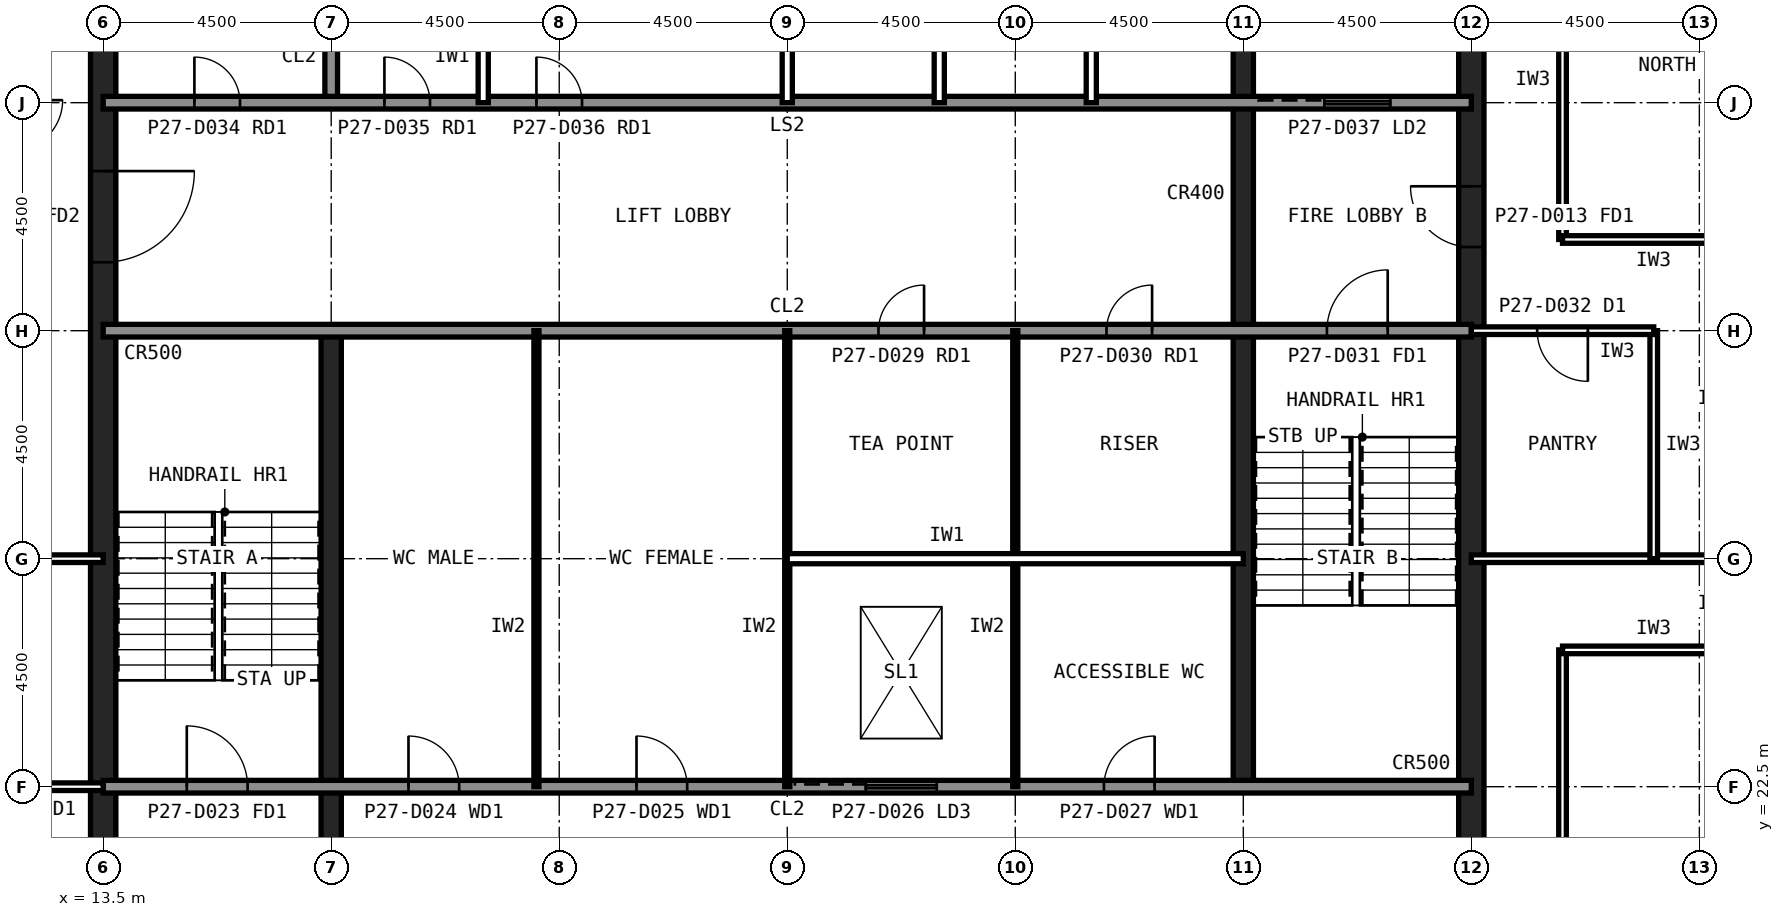
"""IFC4 building model, lengths in metres.
Left out: names, types, materials, properties, quantities, classifications, styles, units other than length and angle.
Written with IfcOpenShell. Run it as: python <this file> out.ifc"""

import sys

from ifc_helpers import new_model, si_unit, direction, frame, frame_2d, origin, place, context, subcontext, project, spatial, rectangle, extrude, element, fill, save


model = new_model("IFC4")
c1 = context("Model", 3, precision=1e-05, world=origin(), true_north=direction((0.0, 1.0)))
c2 = subcontext(c1, "Body", "Model", "MODEL_VIEW")
j1 = project(units=[si_unit("LENGTHUNIT", "METRE"), si_unit("PLANEANGLEUNIT", "RADIAN")], contexts=[c1])
p1 = place(None, origin())
s1 = spatial("IfcSite", under=j1, at=p1, CompositionType="ELEMENT")
p2 = place(p1, origin())
s2 = spatial("IfcBuilding", under=s1, at=p2, CompositionType="ELEMENT")
p3 = place(p2, frame((0.0, 0.0, 119.6)))
s3 = spatial("IfcBuildingStorey", under=s2, at=p3, CompositionType="ELEMENT", Elevation=119.6)
p4 = place(p3, frame((40.5, 13.5, 0.0), z_axis=(0.0, 0.0, 1.0), x_axis=(0.0, 1.0, 0.0)))
e1 = element("IfcWall", 1, at=p4, inside=s3, PredefinedType="SHEAR", context=c2, shape_type="SweptSolid", body=[
    extrude(rectangle(XDim=27.0, YDim=0.5, at=frame_2d((13.5, 0.0))), origin(), (0.0, 0.0, 1.0), 4.0),
])
p5 = place(p4, frame((5.85, 0.0, 0.0)))
e2 = element("IfcOpeningElement", 2, at=p5, cuts=e1, PredefinedType="OPENING", context=c2, shape_type="SweptSolid", body=[
    extrude(rectangle(XDim=1.8, YDim=2.1, at=frame_2d((0.9, 1.05))), frame((0.0, 0.26, 0.0), z_axis=(0.0, -1.0, 0.0), x_axis=(1.0, 0.0, 0.0)), (0.0, 0.0, 1.0), 0.52),
])
p6 = place(p4, frame((19.65, 0.0, 0.0)))
e3 = element("IfcOpeningElement", 3, at=p6, cuts=e1, PredefinedType="OPENING", context=c2, shape_type="SweptSolid", body=[
    extrude(rectangle(XDim=1.2, YDim=2.1, at=frame_2d((0.6, 1.05))), frame((0.0, 0.26, 0.0), z_axis=(0.0, -1.0, 0.0), x_axis=(1.0, 0.0, 0.0)), (0.0, 0.0, 1.0), 0.52),
])
p7 = place(p3, frame((13.5, 40.5, 0.0), z_axis=(0.0, 0.0, 1.0), x_axis=(0.0, -1.0, 0.0)))
e4 = element("IfcWall", 4, at=p7, inside=s3, PredefinedType="SHEAR", context=c2, shape_type="SweptSolid", body=[
    extrude(rectangle(XDim=27.0, YDim=0.5, at=frame_2d((13.5, 0.0))), origin(), (0.0, 0.0, 1.0), 4.0),
])
p8 = place(p7, frame((19.65, 0.0, 0.0)))
e5 = element("IfcOpeningElement", 5, at=p8, cuts=e4, PredefinedType="OPENING", context=c2, shape_type="SweptSolid", body=[
    extrude(rectangle(XDim=1.2, YDim=2.1, at=frame_2d((0.6, 1.05))), frame((0.0, 0.26, 0.0), z_axis=(0.0, -1.0, 0.0), x_axis=(1.0, 0.0, 0.0)), (0.0, 0.0, 1.0), 0.52),
])
p9 = place(p7, frame((5.85, 0.0, 0.0)))
e6 = element("IfcOpeningElement", 6, at=p9, cuts=e4, PredefinedType="OPENING", context=c2, shape_type="SweptSolid", body=[
    extrude(rectangle(XDim=1.8, YDim=2.1, at=frame_2d((0.9, 1.05))), frame((0.0, 0.26, 0.0), z_axis=(0.0, -1.0, 0.0), x_axis=(1.0, 0.0, 0.0)), (0.0, 0.0, 1.0), 0.52),
])
p10 = place(p3, frame((18.0, 13.5, 0.0), z_axis=(0.0, 0.0, 1.0), x_axis=(0.0, 1.0, 0.0)))
e7 = element("IfcWall", 7, at=p10, inside=s3, PredefinedType="SHEAR", context=c2, shape_type="SweptSolid", body=[
    extrude(rectangle(XDim=18.0, YDim=0.4, at=frame_2d((9.0, 0.0))), origin(), (0.0, 0.0, 1.0), 4.0),
])
p11 = place(p3, frame((18.0, 36.0, 0.0), z_axis=(0.0, 0.0, 1.0), x_axis=(0.0, 1.0, 0.0)))
e8 = element("IfcWall", 8, at=p11, inside=s3, PredefinedType="SOLIDWALL", context=c2, shape_type="SweptSolid", body=[
    extrude(rectangle(XDim=4.5, YDim=0.25, at=frame_2d((2.25, 0.0))), origin(), (0.0, 0.0, 1.0), 3.84),
])
p12 = place(p3, frame((36.0, 22.5, 0.0), z_axis=(0.0, 0.0, 1.0), x_axis=(0.0, 1.0, 0.0)))
e9 = element("IfcWall", 9, at=p12, inside=s3, PredefinedType="SHEAR", context=c2, shape_type="SweptSolid", body=[
    extrude(rectangle(XDim=18.0, YDim=0.4, at=frame_2d((9.0, 0.0))), origin(), (0.0, 0.0, 1.0), 4.0),
])
p13 = place(p3, frame((13.5, 36.0, 0.0), z_axis=(0.0, 0.0, 1.0), x_axis=(1.0, 0.0, 0.0)))
e10 = element("IfcWall", 10, at=p13, inside=s3, PredefinedType="SOLIDWALL", context=c2, shape_type="SweptSolid", body=[
    extrude(rectangle(XDim=27.0, YDim=0.25, at=frame_2d((13.5, 0.0))), origin(), (0.0, 0.0, 1.0), 3.84),
])
p14 = place(p13, frame((1.8, 0.0, 0.0)))
e11 = element("IfcOpeningElement", 11, at=p14, cuts=e10, PredefinedType="OPENING", context=c2, shape_type="SweptSolid", body=[
    extrude(rectangle(XDim=0.9, YDim=2.1, at=frame_2d((0.45, 1.05))), frame((0.0, 0.135, 0.0), z_axis=(0.0, -1.0, 0.0), x_axis=(1.0, 0.0, 0.0)), (0.0, 0.0, 1.0), 0.27),
])
p15 = place(p13, frame((5.55, 0.0, 0.0)))
e12 = element("IfcOpeningElement", 12, at=p15, cuts=e10, PredefinedType="OPENING", context=c2, shape_type="SweptSolid", body=[
    extrude(rectangle(XDim=0.9, YDim=2.1, at=frame_2d((0.45, 1.05))), frame((0.0, 0.135, 0.0), z_axis=(0.0, -1.0, 0.0), x_axis=(1.0, 0.0, 0.0)), (0.0, 0.0, 1.0), 0.27),
])
p16 = place(p13, frame((8.55, 0.0, 0.0)))
e13 = element("IfcOpeningElement", 13, at=p16, cuts=e10, PredefinedType="OPENING", context=c2, shape_type="SweptSolid", body=[
    extrude(rectangle(XDim=0.9, YDim=2.1, at=frame_2d((0.45, 1.05))), frame((0.0, 0.135, 0.0), z_axis=(0.0, -1.0, 0.0), x_axis=(1.0, 0.0, 0.0)), (0.0, 0.0, 1.0), 0.27),
])
p17 = place(p13, frame((24.1, 0.0, 0.0)))
e14 = element("IfcOpeningElement", 14, at=p17, cuts=e10, PredefinedType="OPENING", context=c2, shape_type="SweptSolid", body=[
    extrude(rectangle(XDim=1.3, YDim=2.2, at=frame_2d((0.65, 1.1))), frame((0.0, 0.135, 0.0), z_axis=(0.0, -1.0, 0.0), x_axis=(1.0, 0.0, 0.0)), (0.0, 0.0, 1.0), 0.27),
])
p18 = place(p3, frame((13.5, 22.5, 0.0), z_axis=(0.0, 0.0, 1.0), x_axis=(1.0, 0.0, 0.0)))
e15 = element("IfcWall", 15, at=p18, inside=s3, PredefinedType="SOLIDWALL", context=c2, shape_type="SweptSolid", body=[
    extrude(rectangle(XDim=27.0, YDim=0.25, at=frame_2d((13.5, 0.0))), origin(), (0.0, 0.0, 1.0), 3.84),
])
p19 = place(p18, frame((1.65, 0.0, 0.0)))
e16 = element("IfcOpeningElement", 16, at=p19, cuts=e15, PredefinedType="OPENING", context=c2, shape_type="SweptSolid", body=[
    extrude(rectangle(XDim=1.2, YDim=2.1, at=frame_2d((0.6, 1.05))), frame((0.0, 0.135, 0.0), z_axis=(0.0, -1.0, 0.0), x_axis=(1.0, 0.0, 0.0)), (0.0, 0.0, 1.0), 0.27),
])
p20 = place(p18, frame((6.025, 0.0, 0.0)))
e17 = element("IfcOpeningElement", 17, at=p20, cuts=e15, PredefinedType="OPENING", context=c2, shape_type="SweptSolid", body=[
    extrude(rectangle(XDim=1.0, YDim=2.1, at=frame_2d((0.5, 1.05))), frame((0.0, 0.135, 0.0), z_axis=(0.0, -1.0, 0.0), x_axis=(1.0, 0.0, 0.0)), (0.0, 0.0, 1.0), 0.27),
])
p21 = place(p18, frame((10.525, 0.0, 0.0)))
e18 = element("IfcOpeningElement", 18, at=p21, cuts=e15, PredefinedType="OPENING", context=c2, shape_type="SweptSolid", body=[
    extrude(rectangle(XDim=1.0, YDim=2.1, at=frame_2d((0.5, 1.05))), frame((0.0, 0.135, 0.0), z_axis=(0.0, -1.0, 0.0), x_axis=(1.0, 0.0, 0.0)), (0.0, 0.0, 1.0), 0.27),
])
p22 = place(p18, frame((19.75, 0.0, 0.0)))
e19 = element("IfcOpeningElement", 19, at=p22, cuts=e15, PredefinedType="OPENING", context=c2, shape_type="SweptSolid", body=[
    extrude(rectangle(XDim=1.0, YDim=2.1, at=frame_2d((0.5, 1.05))), frame((0.0, 0.135, 0.0), z_axis=(0.0, -1.0, 0.0), x_axis=(1.0, 0.0, 0.0)), (0.0, 0.0, 1.0), 0.27),
])
p23 = place(p18, frame((15.05, 0.0, 0.0)))
e20 = element("IfcOpeningElement", 20, at=p23, cuts=e15, PredefinedType="OPENING", context=c2, shape_type="SweptSolid", body=[
    extrude(rectangle(XDim=1.4, YDim=2.4, at=frame_2d((0.7, 1.2))), frame((0.0, 0.135, 0.0), z_axis=(0.0, -1.0, 0.0), x_axis=(1.0, 0.0, 0.0)), (0.0, 0.0, 1.0), 0.27),
])
p24 = place(p3, frame((13.5, 31.5, 0.0), z_axis=(0.0, 0.0, 1.0), x_axis=(1.0, 0.0, 0.0)))
e21 = element("IfcWall", 21, at=p24, inside=s3, PredefinedType="SOLIDWALL", context=c2, shape_type="SweptSolid", body=[
    extrude(rectangle(XDim=27.0, YDim=0.25, at=frame_2d((13.5, 0.0))), origin(), (0.0, 0.0, 1.0), 3.84),
])
p25 = place(p24, frame((24.15, 0.0, 0.0)))
e22 = element("IfcOpeningElement", 22, at=p25, cuts=e21, PredefinedType="OPENING", context=c2, shape_type="SweptSolid", body=[
    extrude(rectangle(XDim=1.2, YDim=2.1, at=frame_2d((0.6, 1.05))), frame((0.0, 0.135, 0.0), z_axis=(0.0, -1.0, 0.0), x_axis=(1.0, 0.0, 0.0)), (0.0, 0.0, 1.0), 0.27),
])
p26 = place(p24, frame((15.3, 0.0, 0.0)))
e23 = element("IfcOpeningElement", 23, at=p26, cuts=e21, PredefinedType="OPENING", context=c2, shape_type="SweptSolid", body=[
    extrude(rectangle(XDim=0.9, YDim=2.1, at=frame_2d((0.45, 1.05))), frame((0.0, 0.135, 0.0), z_axis=(0.0, -1.0, 0.0), x_axis=(1.0, 0.0, 0.0)), (0.0, 0.0, 1.0), 0.27),
])
p27 = place(p24, frame((19.8, 0.0, 0.0)))
e24 = element("IfcOpeningElement", 24, at=p27, cuts=e21, PredefinedType="OPENING", context=c2, shape_type="SweptSolid", body=[
    extrude(rectangle(XDim=0.9, YDim=2.1, at=frame_2d((0.45, 1.05))), frame((0.0, 0.135, 0.0), z_axis=(0.0, -1.0, 0.0), x_axis=(1.0, 0.0, 0.0)), (0.0, 0.0, 1.0), 0.27),
])
for number, where, z_axis, x_axis in (
    (25, (21.0, 36.0, 0.0), (0.0, 0.0, 1.0), (0.0, 1.0, 0.0)),
    (26, (27.0, 36.0, 0.0), (0.0, 0.0, 1.0), (0.0, 1.0, 0.0)),
    (27, (30.0, 36.0, 0.0), (0.0, 0.0, 1.0), (0.0, 1.0, 0.0)),
    (28, (33.0, 36.0, 0.0), (0.0, 0.0, 1.0), (0.0, 1.0, 0.0)),
):
    element("IfcWall", number, at=place(p3, frame(where, z_axis=z_axis, x_axis=x_axis)), inside=s3, PredefinedType="PARTITIONING", context=c2, shape_type="SweptSolid", body=[
        extrude(rectangle(XDim=4.5, YDim=0.2, at=frame_2d((2.25, 0.0))), origin(), (0.0, 0.0, 1.0), 3.84),
    ])
for number, where, z_axis, x_axis in (
    (29, (22.05, 22.5, 0.0), (0.0, 0.0, 1.0), (0.0, 1.0, 0.0)),
    (30, (27.0, 22.5, 0.0), (0.0, 0.0, 1.0), (0.0, 1.0, 0.0)),
    (31, (31.5, 22.5, 0.0), (0.0, 0.0, 1.0), (0.0, 1.0, 0.0)),
):
    element("IfcWall", number, at=place(p3, frame(where, z_axis=z_axis, x_axis=x_axis)), inside=s3, PredefinedType="PLUMBINGWALL", context=c2, shape_type="SweptSolid", body=[
        extrude(rectangle(XDim=9.0, YDim=0.1, at=frame_2d((4.5, 0.0))), origin(), (0.0, 0.0, 1.0), 3.84),
    ])
p28 = place(p3, frame((27.0, 27.0, 0.0), z_axis=(0.0, 0.0, 1.0), x_axis=(1.0, 0.0, 0.0)))
e32 = element("IfcWall", 32, at=p28, inside=s3, PredefinedType="PARTITIONING", context=c2, shape_type="SweptSolid", body=[
    extrude(rectangle(XDim=9.0, YDim=0.2, at=frame_2d((4.5, 0.0))), origin(), (0.0, 0.0, 1.0), 3.84),
])
for number, where, z_axis, x_axis in (
    (33, (0.385, 27.0, 0.0), (0.0, 0.0, 1.0), (1.0, 0.0, 0.0)),
    (34, (40.5, 27.0, 0.0), (0.0, 0.0, 1.0), (1.0, 0.0, 0.0)),
):
    element("IfcWall", number, at=place(p3, frame(where, z_axis=z_axis, x_axis=x_axis)), inside=s3, PredefinedType="PARTITIONING", context=c2, shape_type="SweptSolid", body=[
        extrude(rectangle(XDim=13.115, YDim=0.15, at=frame_2d((6.558, 0.0))), origin(), (0.0, 0.0, 1.0), 2.989),
    ])
p29 = place(p3, frame((42.3, 11.7, 0.0), z_axis=(0.0, 0.0, 1.0), x_axis=(0.0, 1.0, 0.0)))
e35 = element("IfcWall", 35, at=p29, inside=s3, PredefinedType="PARTITIONING", context=c2, shape_type="SweptSolid", body=[
    extrude(rectangle(XDim=13.5, YDim=0.15, at=frame_2d((6.75, 0.0))), origin(), (0.0, 0.0, 1.0), 3.84),
])
p30 = place(p29, frame((6.25, 0.0, 0.0)))
e36 = element("IfcOpeningElement", 36, at=p30, cuts=e35, PredefinedType="OPENING", context=c2, shape_type="SweptSolid", body=[
    extrude(rectangle(XDim=1.0, YDim=2.1, at=frame_2d((0.5, 1.05))), frame((0.0, 0.085, 0.0), z_axis=(0.0, -1.0, 0.0), x_axis=(1.0, 0.0, 0.0)), (0.0, 0.0, 1.0), 0.17),
])
p31 = place(p3, frame((42.3, 25.2, 0.0), z_axis=(0.0, 0.0, 1.0), x_axis=(1.0, 0.0, 0.0)))
e37 = element("IfcWall", 37, at=p31, inside=s3, PredefinedType="PARTITIONING", context=c2, shape_type="SweptSolid", body=[
    extrude(rectangle(XDim=3.6, YDim=0.15, at=frame_2d((1.8, 0.0))), origin(), (0.0, 0.0, 1.0), 3.84),
])
p32 = place(p3, frame((42.3, 33.3, 0.0), z_axis=(0.0, 0.0, 1.0), x_axis=(0.0, 1.0, 0.0)))
e38 = element("IfcWall", 38, at=p32, inside=s3, PredefinedType="PARTITIONING", context=c2, shape_type="SweptSolid", body=[
    extrude(rectangle(XDim=9.0, YDim=0.15, at=frame_2d((4.5, 0.0))), origin(), (0.0, 0.0, 1.0), 3.84),
])
p33 = place(p32, frame((4.0, 0.0, 0.0)))
e39 = element("IfcOpeningElement", 39, at=p33, cuts=e38, PredefinedType="OPENING", context=c2, shape_type="SweptSolid", body=[
    extrude(rectangle(XDim=1.0, YDim=2.1, at=frame_2d((0.5, 1.05))), frame((0.0, 0.085, 0.0), z_axis=(0.0, -1.0, 0.0), x_axis=(1.0, 0.0, 0.0)), (0.0, 0.0, 1.0), 0.17),
])
p34 = place(p3, frame((45.9, 33.3, 0.0), z_axis=(0.0, 0.0, 1.0), x_axis=(-1.0, 0.0, 0.0)))
e40 = element("IfcWall", 40, at=p34, inside=s3, PredefinedType="PARTITIONING", context=c2, shape_type="SweptSolid", body=[
    extrude(rectangle(XDim=3.6, YDim=0.15, at=frame_2d((1.8, 0.0))), origin(), (0.0, 0.0, 1.0), 3.84),
])
p35 = place(p3, frame((9.9, 22.5, 0.0), z_axis=(0.0, 0.0, 1.0), x_axis=(1.0, 0.0, 0.0)))
e41 = element("IfcWall", 41, at=p35, inside=s3, PredefinedType="PARTITIONING", context=c2, shape_type="SweptSolid", body=[
    extrude(rectangle(XDim=3.6, YDim=0.15, at=frame_2d((1.8, 0.0))), origin(), (0.0, 0.0, 1.0), 2.989),
])
p36 = place(p35, frame((1.3, 0.0, 0.0)))
e42 = element("IfcOpeningElement", 42, at=p36, cuts=e41, PredefinedType="OPENING", context=c2, shape_type="SweptSolid", body=[
    extrude(rectangle(XDim=1.0, YDim=2.1, at=frame_2d((0.5, 1.05))), frame((0.0, 0.085, 0.0), z_axis=(0.0, -1.0, 0.0), x_axis=(1.0, 0.0, 0.0)), (0.0, 0.0, 1.0), 0.17),
])
p37 = place(p3, frame((44.1, 27.0, 0.0), z_axis=(0.0, 0.0, 1.0), x_axis=(0.0, 1.0, 0.0)))
e43 = element("IfcWall", 43, at=p37, inside=s3, PredefinedType="PARTITIONING", context=c2, shape_type="SweptSolid", body=[
    extrude(rectangle(XDim=4.5, YDim=0.15, at=frame_2d((2.25, 0.0))), origin(), (0.0, 0.0, 1.0), 3.84),
])
p38 = place(p3, frame((44.1, 31.5, 0.0), z_axis=(0.0, 0.0, 1.0), x_axis=(-1.0, 0.0, 0.0)))
e44 = element("IfcWall", 44, at=p38, inside=s3, PredefinedType="PARTITIONING", context=c2, shape_type="SweptSolid", body=[
    extrude(rectangle(XDim=3.6, YDim=0.15, at=frame_2d((1.8, 0.0))), origin(), (0.0, 0.0, 1.0), 2.989),
])
p39 = place(p38, frame((1.3, 0.0, 0.0)))
e45 = element("IfcOpeningElement", 45, at=p39, cuts=e44, PredefinedType="OPENING", context=c2, shape_type="SweptSolid", body=[
    extrude(rectangle(XDim=1.0, YDim=2.1, at=frame_2d((0.5, 1.05))), frame((0.0, 0.085, 0.0), z_axis=(0.0, -1.0, 0.0), x_axis=(1.0, 0.0, 0.0)), (0.0, 0.0, 1.0), 0.17),
])
p40 = place(p9, origin())
e46 = element("IfcDoor", 46, at=p40, inside=s3, OperationType="SINGLE_SWING_LEFT", PredefinedType="DOOR", context=c2, shape_type="SweptSolid", body=[
    extrude(rectangle(XDim=1.8, YDim=2.1, at=frame_2d((0.9, 1.05))), frame((0.0, 0.025, 0.0), z_axis=(0.0, -1.0, 0.0), x_axis=(1.0, 0.0, 0.0)), (0.0, 0.0, 1.0), 0.05),
])
fill(e6, e46)
p41 = place(p6, origin())
e47 = element("IfcDoor", 47, at=p41, inside=s3, OperationType="SINGLE_SWING_RIGHT", PredefinedType="DOOR", context=c2, shape_type="SweptSolid", body=[
    extrude(rectangle(XDim=1.2, YDim=2.1, at=frame_2d((0.6, 1.05))), frame((0.0, 0.025, 0.0), z_axis=(0.0, -1.0, 0.0), x_axis=(1.0, 0.0, 0.0)), (0.0, 0.0, 1.0), 0.05),
])
fill(e3, e47)
p42 = place(p19, origin())
e48 = element("IfcDoor", 48, at=p42, inside=s3, OperationType="SINGLE_SWING_LEFT", PredefinedType="DOOR", context=c2, shape_type="SweptSolid", body=[
    extrude(rectangle(XDim=1.2, YDim=2.1, at=frame_2d((0.6, 1.05))), frame((0.0, 0.025, 0.0), z_axis=(0.0, -1.0, 0.0), x_axis=(1.0, 0.0, 0.0)), (0.0, 0.0, 1.0), 0.05),
])
fill(e16, e48)
p43 = place(p25, origin())
e49 = element("IfcDoor", 49, at=p43, inside=s3, OperationType="SINGLE_SWING_RIGHT", PredefinedType="DOOR", context=c2, shape_type="SweptSolid", body=[
    extrude(rectangle(XDim=1.2, YDim=2.1, at=frame_2d((0.6, 1.05))), frame((0.0, 0.025, 0.0), z_axis=(0.0, -1.0, 0.0), x_axis=(1.0, 0.0, 0.0)), (0.0, 0.0, 1.0), 0.05),
])
fill(e22, e49)
p44 = place(p20, origin())
e50 = element("IfcDoor", 50, at=p44, inside=s3, OperationType="SINGLE_SWING_LEFT", PredefinedType="DOOR", context=c2, shape_type="SweptSolid", body=[
    extrude(rectangle(XDim=1.0, YDim=2.1, at=frame_2d((0.5, 1.05))), frame((0.0, 0.025, 0.0), z_axis=(0.0, -1.0, 0.0), x_axis=(1.0, 0.0, 0.0)), (0.0, 0.0, 1.0), 0.05),
])
fill(e17, e50)
p45 = place(p21, origin())
e51 = element("IfcDoor", 51, at=p45, inside=s3, OperationType="SINGLE_SWING_LEFT", PredefinedType="DOOR", context=c2, shape_type="SweptSolid", body=[
    extrude(rectangle(XDim=1.0, YDim=2.1, at=frame_2d((0.5, 1.05))), frame((0.0, 0.025, 0.0), z_axis=(0.0, -1.0, 0.0), x_axis=(1.0, 0.0, 0.0)), (0.0, 0.0, 1.0), 0.05),
])
fill(e18, e51)
p46 = place(p22, origin())
e52 = element("IfcDoor", 52, at=p46, inside=s3, OperationType="SINGLE_SWING_RIGHT", PredefinedType="DOOR", context=c2, shape_type="SweptSolid", body=[
    extrude(rectangle(XDim=1.0, YDim=2.1, at=frame_2d((0.5, 1.05))), frame((0.0, 0.025, 0.0), z_axis=(0.0, -1.0, 0.0), x_axis=(1.0, 0.0, 0.0)), (0.0, 0.0, 1.0), 0.05),
])
fill(e19, e52)
p47 = place(p26, origin())
e53 = element("IfcDoor", 53, at=p47, inside=s3, OperationType="SINGLE_SWING_RIGHT", PredefinedType="DOOR", context=c2, shape_type="SweptSolid", body=[
    extrude(rectangle(XDim=0.9, YDim=2.1, at=frame_2d((0.45, 1.05))), frame((0.0, 0.025, 0.0), z_axis=(0.0, -1.0, 0.0), x_axis=(1.0, 0.0, 0.0)), (0.0, 0.0, 1.0), 0.05),
])
fill(e23, e53)
p48 = place(p27, origin())
e54 = element("IfcDoor", 54, at=p48, inside=s3, OperationType="SINGLE_SWING_RIGHT", PredefinedType="DOOR", context=c2, shape_type="SweptSolid", body=[
    extrude(rectangle(XDim=0.9, YDim=2.1, at=frame_2d((0.45, 1.05))), frame((0.0, 0.025, 0.0), z_axis=(0.0, -1.0, 0.0), x_axis=(1.0, 0.0, 0.0)), (0.0, 0.0, 1.0), 0.05),
])
fill(e24, e54)
p49 = place(p14, origin())
e55 = element("IfcDoor", 55, at=p49, inside=s3, OperationType="SINGLE_SWING_LEFT", PredefinedType="DOOR", context=c2, shape_type="SweptSolid", body=[
    extrude(rectangle(XDim=0.9, YDim=2.1, at=frame_2d((0.45, 1.05))), frame((0.0, 0.025, 0.0), z_axis=(0.0, -1.0, 0.0), x_axis=(1.0, 0.0, 0.0)), (0.0, 0.0, 1.0), 0.05),
])
fill(e11, e55)
p50 = place(p15, origin())
e56 = element("IfcDoor", 56, at=p50, inside=s3, OperationType="SINGLE_SWING_LEFT", PredefinedType="DOOR", context=c2, shape_type="SweptSolid", body=[
    extrude(rectangle(XDim=0.9, YDim=2.1, at=frame_2d((0.45, 1.05))), frame((0.0, 0.025, 0.0), z_axis=(0.0, -1.0, 0.0), x_axis=(1.0, 0.0, 0.0)), (0.0, 0.0, 1.0), 0.05),
])
fill(e12, e56)
p51 = place(p16, origin())
e57 = element("IfcDoor", 57, at=p51, inside=s3, OperationType="SINGLE_SWING_LEFT", PredefinedType="DOOR", context=c2, shape_type="SweptSolid", body=[
    extrude(rectangle(XDim=0.9, YDim=2.1, at=frame_2d((0.45, 1.05))), frame((0.0, 0.025, 0.0), z_axis=(0.0, -1.0, 0.0), x_axis=(1.0, 0.0, 0.0)), (0.0, 0.0, 1.0), 0.05),
])
fill(e13, e57)
p52 = place(p17, origin())
e58 = element("IfcDoor", 58, at=p52, inside=s3, OperationType="SLIDING_TO_LEFT", PredefinedType="DOOR", context=c2, shape_type="SweptSolid", body=[
    extrude(rectangle(XDim=1.3, YDim=2.2, at=frame_2d((0.65, 1.1))), frame((0.0, 0.025, 0.0), z_axis=(0.0, -1.0, 0.0), x_axis=(1.0, 0.0, 0.0)), (0.0, 0.0, 1.0), 0.05),
])
fill(e14, e58)
p53 = place(p23, origin())
e59 = element("IfcDoor", 59, at=p53, inside=s3, OperationType="SLIDING_TO_LEFT", PredefinedType="DOOR", context=c2, shape_type="SweptSolid", body=[
    extrude(rectangle(XDim=1.4, YDim=2.4, at=frame_2d((0.7, 1.2))), frame((0.0, 0.025, 0.0), z_axis=(0.0, -1.0, 0.0), x_axis=(1.0, 0.0, 0.0)), (0.0, 0.0, 1.0), 0.05),
])
fill(e20, e59)
p54 = place(p39, origin())
e60 = element("IfcDoor", 60, at=p54, inside=s3, OperationType="SINGLE_SWING_LEFT", PredefinedType="DOOR", context=c2, shape_type="SweptSolid", body=[
    extrude(rectangle(XDim=1.0, YDim=2.1, at=frame_2d((0.5, 1.05))), frame((0.0, 0.025, 0.0), z_axis=(0.0, -1.0, 0.0), x_axis=(1.0, 0.0, 0.0)), (0.0, 0.0, 1.0), 0.05),
])
fill(e45, e60)
save(model, sys.argv[1])
